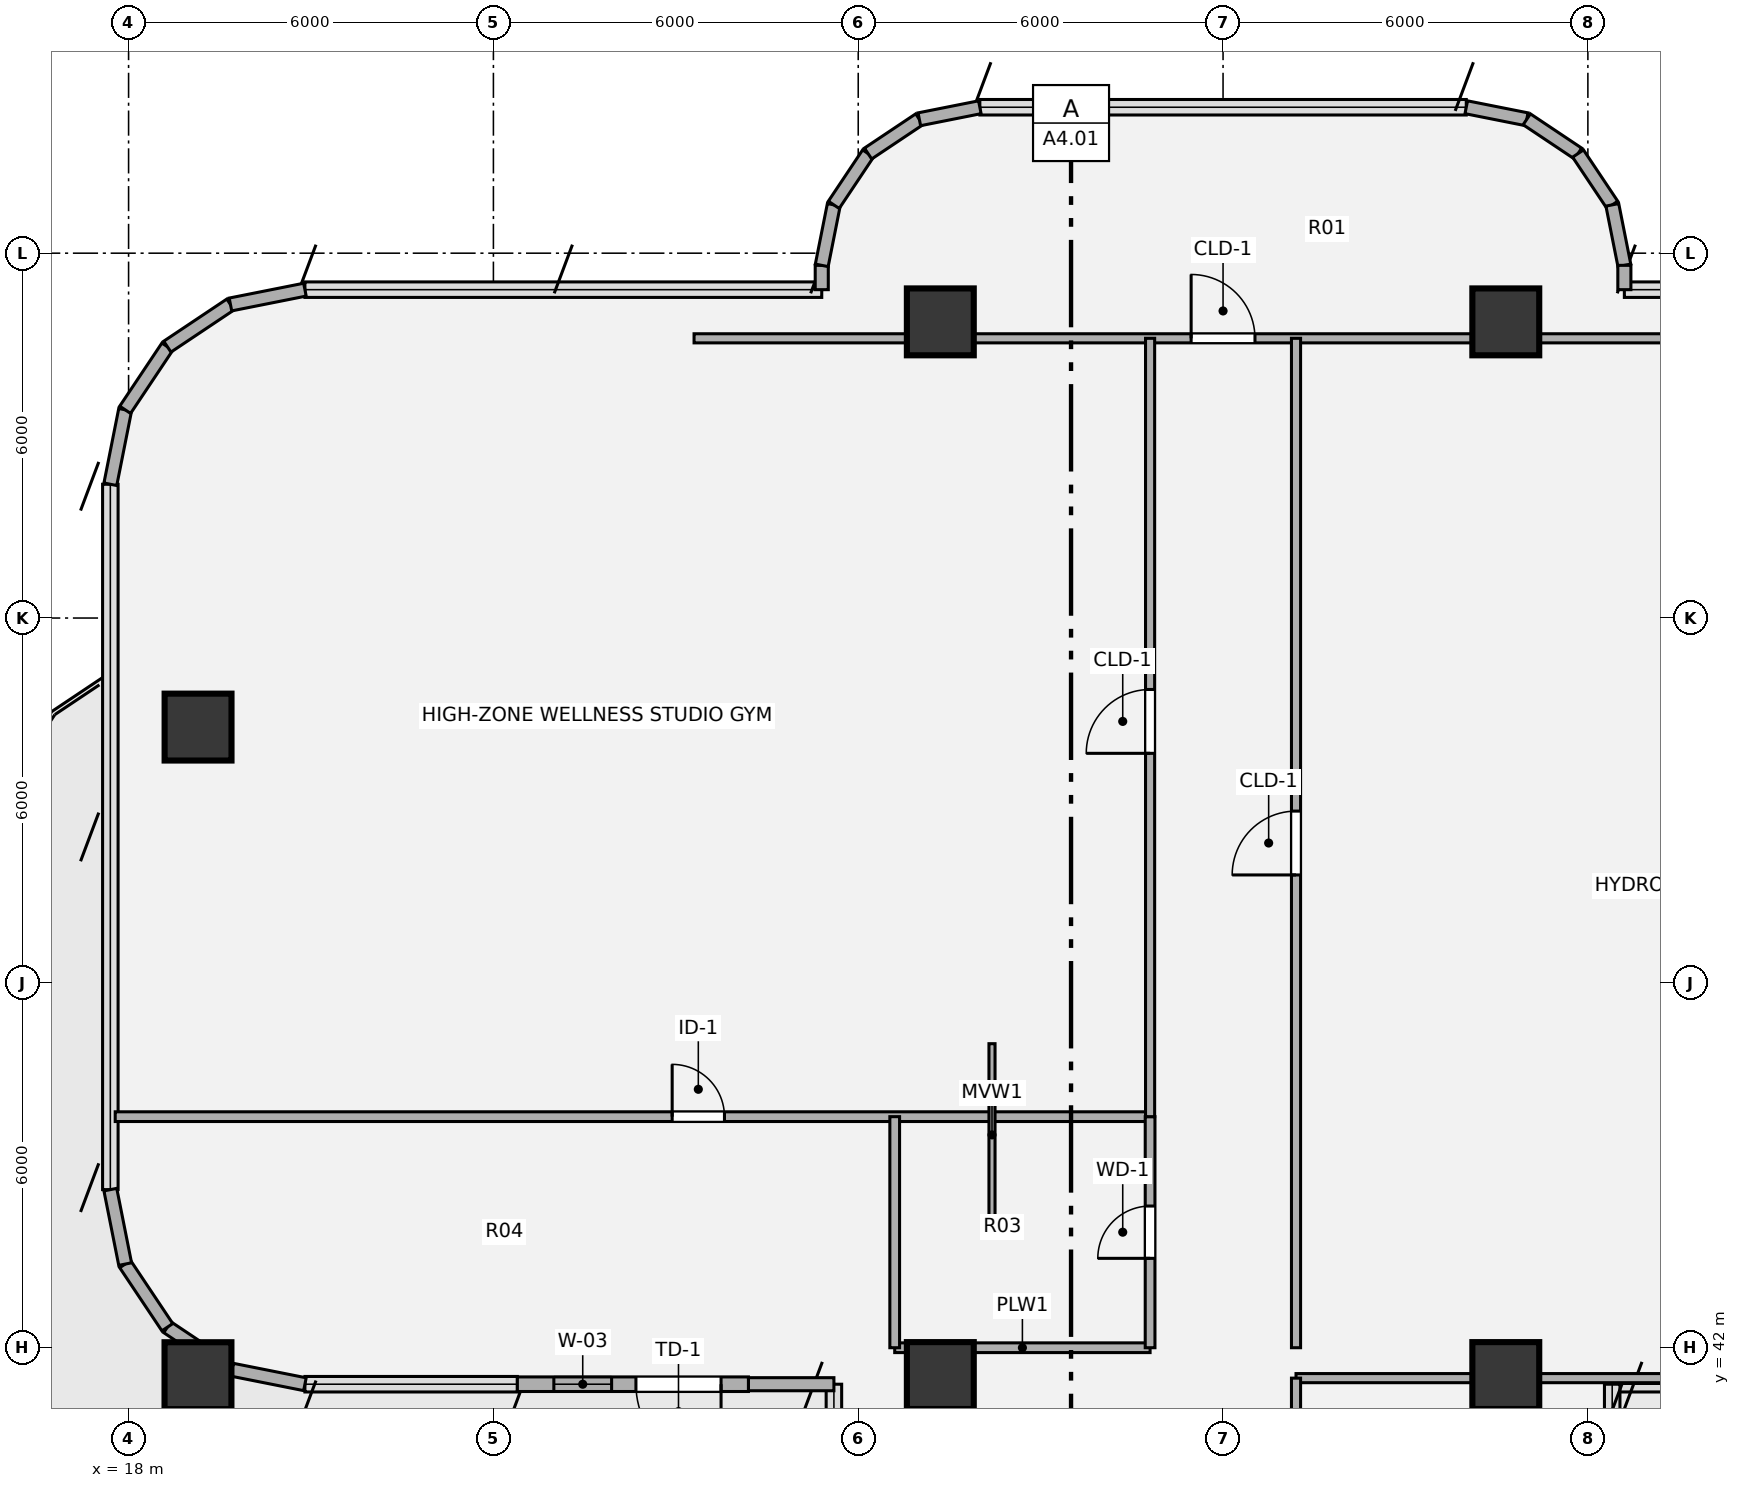
"""IFC4 building model, lengths in metres.
Left out: names, types, materials, properties, quantities, classifications, styles, units other than length and angle.
Written with IfcOpenShell. Run it as: python <this file> out.ifc"""

import sys

from ifc_helpers import new_model, si_unit, direction, frame, frame_2d, origin, origin_2d, place, context, subcontext, project, spatial, rectangle, hollow_circle, extrude, source, transform, mapped, element, fill, save


model = new_model("IFC4")
c1 = context("Model", 3, precision=1e-05, world=origin(), true_north=direction((0.0, 1.0)))
c2 = subcontext(c1, "Body", "Model", "MODEL_VIEW")
j1 = project(units=[si_unit("LENGTHUNIT", "METRE"), si_unit("PLANEANGLEUNIT", "RADIAN")], contexts=[c1])
p1 = place(None, origin())
s1 = spatial("IfcSite", under=j1, at=p1, CompositionType="ELEMENT")
p2 = place(p1, origin())
s2 = spatial("IfcBuilding", under=s1, at=p2, CompositionType="ELEMENT")
p3 = place(p2, frame((0.0, 0.0, 218.52)))
s3 = spatial("IfcBuildingStorey", under=s2, at=p3, CompositionType="ELEMENT", Elevation=218.52)
m1 = source(origin(), c2, "Body", "SweptSolid", [
    extrude(hollow_circle(Radius=0.55, WallThickness=0.04, at=origin_2d()), origin(), (0.0, 0.0, 1.0), 5.049),
])
p4 = place(p3, frame((18.786, 39.859, 0.0), z_axis=(0.140579075129, 0.665997599821, 0.73258768804), x_axis=(-0.978440346297, 0.206529631621, 0.0)))
e1 = element("IfcColumn", 1, at=p4, inside=s3, PredefinedType="COLUMN", context=c2, shape_type="MappedRepresentation", body=[
    mapped(m1, transform((0.0, 0.0, 0.0), x_axis=(1.0, 0.0, 0.0), y_axis=(0.0, 1.0, 0.0), z_axis=(0.0, 0.0, 1.0), scale=1.0)),
])
m2 = source(origin(), c2, "Body", "SweptSolid", [
    extrude(hollow_circle(Radius=0.55, WallThickness=0.04, at=origin_2d()), origin(), (0.0, 0.0, 1.0), 4.92),
])
p5 = place(p3, frame((18.786, 50.632, 0.0), z_axis=(0.144797912538, 0.640177474177, 0.754457663545), x_axis=(-0.975361817364, 0.220611253629, 0.0)))
e2 = element("IfcColumn", 2, at=p5, inside=s3, PredefinedType="COLUMN", context=c2, shape_type="MappedRepresentation", body=[
    mapped(m2, transform((0.0, 0.0, 0.0), x_axis=(1.0, 0.0, 0.0), y_axis=(0.0, 1.0, 0.0), z_axis=(0.0, 0.0, 1.0), scale=1.0)),
])
m3 = source(origin(), c2, "Body", "SweptSolid", [
    extrude(hollow_circle(Radius=0.55, WallThickness=0.04, at=origin_2d()), origin(), (0.0, 0.0, 1.0), 5.004),
])
for number, where, z_axis, x_axis in (
    (3, (31.35, 39.859, 0.0), (0.0, 0.673, 0.74), (-1.0, 0.0, 0.0)),
    (4, (40.65, 39.859, 0.0), (0.0, 0.673, 0.74), (-1.0, 0.0, 0.0)),
):
    element("IfcColumn", number, at=place(p3, frame(where, z_axis=z_axis, x_axis=x_axis)), inside=s3, PredefinedType="COLUMN", context=c2, shape_type="MappedRepresentation", body=[
        mapped(m3, transform((0.0, 0.0, 0.0), x_axis=(1.0, 0.0, 0.0), y_axis=(0.0, 1.0, 0.0), z_axis=(0.0, 0.0, 1.0), scale=1.0)),
    ])
m4 = source(origin(), c2, "Body", "SweptSolid", [
    extrude(hollow_circle(Radius=0.55, WallThickness=0.04, at=origin_2d()), origin(), (0.0, 0.0, 1.0), 4.429),
])
for number, where, z_axis, x_axis in (
    (5, (31.35, 57.723, 0.0), (0.0, 0.518, 0.855), (-1.0, 0.0, 0.0)),
    (6, (40.65, 57.723, 0.0), (0.0, 0.518, 0.855), (-1.0, 0.0, 0.0)),
):
    element("IfcColumn", number, at=place(p3, frame(where, z_axis=z_axis, x_axis=x_axis)), inside=s3, PredefinedType="COLUMN", context=c2, shape_type="MappedRepresentation", body=[
        mapped(m4, transform((0.0, 0.0, 0.0), x_axis=(1.0, 0.0, 0.0), y_axis=(0.0, 1.0, 0.0), z_axis=(0.0, 0.0, 1.0), scale=1.0)),
    ])
p6 = place(p3, frame((29.6, 41.4, 0.0), z_axis=(0.0, 0.0, 1.0), x_axis=(-1.0, 0.0, 0.0)))
e7 = element("IfcWall", 7, at=p6, inside=s3, PredefinedType="SOLIDWALL", context=c2, shape_type="SweptSolid", body=[
    extrude(rectangle(XDim=1.406, YDim=0.215, at=frame_2d((0.703, 0.0))), origin(), (0.0, 0.0, 1.0), 4.092),
])
p7 = place(p3, frame((28.194, 41.4, 0.0), z_axis=(0.0, 0.0, 1.0), x_axis=(-1.0, 0.0, 0.0)))
e8 = element("IfcWall", 8, at=p7, inside=s3, PredefinedType="SOLIDWALL", context=c2, shape_type="SweptSolid", body=[
    extrude(rectangle(XDim=3.8, YDim=0.24, at=frame_2d((1.9, 0.0))), origin(), (0.0, 0.0, 1.0), 4.092),
])
p8 = place(p7, frame((0.45, 0.0, 0.0)))
e9 = element("IfcOpeningElement", 9, at=p8, cuts=e8, PredefinedType="OPENING", context=c2, shape_type="SweptSolid", body=[
    extrude(rectangle(XDim=1.4, YDim=2.15, at=origin_2d()), frame((0.7, 0.13, 1.075), z_axis=(0.0, -1.0, 0.0), x_axis=(1.0, 0.0, 0.0)), (0.0, 0.0, 1.0), 0.26),
])
p9 = place(p7, frame((2.25, 0.0, 0.85)))
e10 = element("IfcOpeningElement", 10, at=p9, cuts=e8, PredefinedType="OPENING", context=c2, shape_type="SweptSolid", body=[
    extrude(rectangle(XDim=0.95, YDim=1.35, at=origin_2d()), frame((0.475, 0.13, 0.675), z_axis=(0.0, -1.0, 0.0), x_axis=(1.0, 0.0, 0.0)), (0.0, 0.0, 1.0), 0.26),
])
for number, where, z_axis, x_axis in (
    (11, (20.9, 41.4, 0.0), (0.0, 0.0, 1.0), (-0.981, 0.195, 0.0)),
    (12, (19.675, 41.644, 0.0), (0.0, 0.0, 1.0), (-0.831, 0.556, 0.0)),
    (13, (18.637, 42.337, 0.0), (0.0, 0.0, 1.0), (-0.556, 0.831, 0.0)),
    (14, (17.944, 43.375, 0.0), (0.0, 0.0, 1.0), (-0.195, 0.981, 0.0)),
    (15, (17.7, 56.2, 0.0), (0.0, 0.0, 1.0), (0.195, 0.981, 0.0)),
    (16, (17.944, 57.425, 0.0), (0.0, 0.0, 1.0), (0.556, 0.831, 0.0)),
    (17, (18.637, 58.463, 0.0), (0.0, 0.0, 1.0), (0.831, 0.556, 0.0)),
    (18, (19.675, 59.156, 0.0), (0.0, 0.0, 1.0), (0.981, 0.195, 0.0)),
):
    element("IfcWall", number, at=place(p3, frame(where, z_axis=z_axis, x_axis=x_axis)), inside=s3, PredefinedType="SOLIDWALL", context=c2, shape_type="SweptSolid", body=[
        extrude(rectangle(XDim=1.249, YDim=0.215, at=frame_2d((0.624, 0.0))), origin(), (0.0, 0.0, 1.0), 4.092),
    ])
p10 = place(p3, frame((29.4, 59.4, 0.0), z_axis=(0.0, 0.0, 1.0), x_axis=(0.0, 1.0, 0.0)))
e19 = element("IfcWall", 19, at=p10, inside=s3, PredefinedType="SOLIDWALL", context=c2, shape_type="SweptSolid", body=[
    extrude(rectangle(XDim=0.4, YDim=0.215, at=frame_2d((0.2, 0.0))), origin(), (0.0, 0.0, 1.0), 4.092),
])
p11 = place(p3, frame((29.4, 59.8, 0.0), z_axis=(0.0, 0.0, 1.0), x_axis=(0.195190360752, 0.980765376158, 0.0)))
e20 = element("IfcWall", 20, at=p11, inside=s3, PredefinedType="SOLIDWALL", context=c2, shape_type="SweptSolid", body=[
    extrude(rectangle(XDim=1.014, YDim=0.215, at=frame_2d((0.507, 0.0))), origin(), (0.0, 0.0, 1.0), 4.092),
])
p12 = place(p3, frame((29.598, 60.795, 0.0), z_axis=(0.0, 0.0, 1.0), x_axis=(0.555643898837, 0.831420385657, 0.0)))
e21 = element("IfcWall", 21, at=p12, inside=s3, PredefinedType="SOLIDWALL", context=c2, shape_type="SweptSolid", body=[
    extrude(rectangle(XDim=1.015, YDim=0.215, at=frame_2d((0.507, 0.0))), origin(), (0.0, 0.0, 1.0), 4.092),
])
p13 = place(p3, frame((30.162, 61.638, 0.0), z_axis=(0.0, 0.0, 1.0), x_axis=(0.831346067305, 0.555755086685, 0.0)))
e22 = element("IfcWall", 22, at=p13, inside=s3, PredefinedType="SOLIDWALL", context=c2, shape_type="SweptSolid", body=[
    extrude(rectangle(XDim=1.014, YDim=0.215, at=frame_2d((0.507, 0.0))), origin(), (0.0, 0.0, 1.0), 4.092),
])
for number, where, z_axis, x_axis in (
    (23, (31.005, 62.202, 0.0), (0.0, 0.0, 1.0), (0.981, 0.195, 0.0)),
    (24, (40.0, 62.4, 0.0), (0.0, 0.0, 1.0), (0.981, -0.195, 0.0)),
):
    element("IfcWall", number, at=place(p3, frame(where, z_axis=z_axis, x_axis=x_axis)), inside=s3, PredefinedType="SOLIDWALL", context=c2, shape_type="SweptSolid", body=[
        extrude(rectangle(XDim=1.015, YDim=0.215, at=frame_2d((0.507, 0.0))), origin(), (0.0, 0.0, 1.0), 4.092),
    ])
p14 = place(p3, frame((40.995, 62.202, 0.0), z_axis=(0.0, 0.0, 1.0), x_axis=(0.831346067305, -0.555755086685, 0.0)))
e25 = element("IfcWall", 25, at=p14, inside=s3, PredefinedType="SOLIDWALL", context=c2, shape_type="SweptSolid", body=[
    extrude(rectangle(XDim=1.014, YDim=0.215, at=frame_2d((0.507, 0.0))), origin(), (0.0, 0.0, 1.0), 4.092),
])
p15 = place(p3, frame((41.838, 61.638, 0.0), z_axis=(0.0, 0.0, 1.0), x_axis=(0.555643898837, -0.831420385657, 0.0)))
e26 = element("IfcWall", 26, at=p15, inside=s3, PredefinedType="SOLIDWALL", context=c2, shape_type="SweptSolid", body=[
    extrude(rectangle(XDim=1.015, YDim=0.215, at=frame_2d((0.507, 0.0))), origin(), (0.0, 0.0, 1.0), 4.092),
])
p16 = place(p3, frame((42.402, 60.795, 0.0), z_axis=(0.0, 0.0, 1.0), x_axis=(0.195190360752, -0.980765376158, 0.0)))
e27 = element("IfcWall", 27, at=p16, inside=s3, PredefinedType="SOLIDWALL", context=c2, shape_type="SweptSolid", body=[
    extrude(rectangle(XDim=1.014, YDim=0.215, at=frame_2d((0.507, 0.0))), origin(), (0.0, 0.0, 1.0), 4.092),
])
p17 = place(p3, frame((42.6, 59.8, 0.0), z_axis=(0.0, 0.0, 1.0), x_axis=(0.0, -1.0, 0.0)))
e28 = element("IfcWall", 28, at=p17, inside=s3, PredefinedType="SOLIDWALL", context=c2, shape_type="SweptSolid", body=[
    extrude(rectangle(XDim=0.4, YDim=0.215, at=frame_2d((0.2, 0.0))), origin(), (0.0, 0.0, 1.0), 4.092),
])
p18 = place(p3, frame((37.2, 41.5, 0.0), z_axis=(0.0, 0.0, 1.0), x_axis=(1.0, 0.0, 0.0)))
e29 = element("IfcWall", 29, at=p18, inside=s3, PredefinedType="PARTITIONING", context=c2, shape_type="SweptSolid", body=[
    extrude(rectangle(XDim=7.21, YDim=0.15, at=frame_2d((3.605, 0.0))), origin(), (0.0, 0.0, 1.0), 4.062),
])
p19 = place(p3, frame((30.6, 42.0, 0.0), z_axis=(0.0, 0.0, 1.0), x_axis=(1.0, 0.0, 0.0)))
e30 = element("IfcWall", 30, at=p19, inside=s3, PredefinedType="PLUMBINGWALL", context=c2, shape_type="SweptSolid", body=[
    extrude(rectangle(XDim=4.2, YDim=0.16, at=frame_2d((2.1, 0.0))), origin(), (0.0, 0.0, 1.0), 4.062),
])
p20 = place(p3, frame((17.78, 45.8, 0.0), z_axis=(0.0, 0.0, 1.0), x_axis=(1.0, 0.0, 0.0)))
e31 = element("IfcWall", 31, at=p20, inside=s3, PredefinedType="PLUMBINGWALL", context=c2, shape_type="SweptSolid", body=[
    extrude(rectangle(XDim=17.02, YDim=0.16, at=frame_2d((8.51, 0.0))), origin(), (0.0, 0.0, 1.0), 3.544),
])
p21 = place(p20, frame((9.16, 0.0, 0.0)))
e32 = element("IfcOpeningElement", 32, at=p21, cuts=e31, PredefinedType="OPENING", context=c2, shape_type="SweptSolid", body=[
    extrude(rectangle(XDim=0.86, YDim=2.1, at=origin_2d()), frame((0.43, 0.09, 1.05), z_axis=(0.0, -1.0, 0.0), x_axis=(1.0, 0.0, 0.0)), (0.0, 0.0, 1.0), 0.18),
])
p22 = place(p3, frame((27.3, 58.6, 0.0), z_axis=(0.0, 0.0, 1.0), x_axis=(1.0, 0.0, 0.0)))
e33 = element("IfcWall", 33, at=p22, inside=s3, PredefinedType="PARTITIONING", context=c2, shape_type="SweptSolid", body=[
    extrude(rectangle(XDim=17.4, YDim=0.15, at=frame_2d((8.7, 0.0))), origin(), (0.0, 0.0, 1.0), 3.87),
])
p23 = place(p22, frame((8.175, 0.0, 0.0)))
e34 = element("IfcOpeningElement", 34, at=p23, cuts=e33, PredefinedType="OPENING", context=c2, shape_type="SweptSolid", body=[
    extrude(rectangle(XDim=1.05, YDim=2.1, at=origin_2d()), frame((0.525, 0.085, 1.05), z_axis=(0.0, -1.0, 0.0), x_axis=(1.0, 0.0, 0.0)), (0.0, 0.0, 1.0), 0.17),
])
p24 = place(p3, frame((30.6, 42.0, 0.0), z_axis=(0.0, 0.0, 1.0), x_axis=(0.0, 1.0, 0.0)))
e35 = element("IfcWall", 35, at=p24, inside=s3, PredefinedType="PLUMBINGWALL", context=c2, shape_type="SweptSolid", body=[
    extrude(rectangle(XDim=3.8, YDim=0.16, at=frame_2d((1.9, 0.0))), origin(), (0.0, 0.0, 1.0), 4.062),
])
p25 = place(p3, frame((34.8, 42.0, 0.0), z_axis=(0.0, 0.0, 1.0), x_axis=(0.0, 1.0, 0.0)))
e36 = element("IfcWall", 36, at=p25, inside=s3, PredefinedType="PLUMBINGWALL", context=c2, shape_type="SweptSolid", body=[
    extrude(rectangle(XDim=3.8, YDim=0.16, at=frame_2d((1.9, 0.0))), origin(), (0.0, 0.0, 1.0), 4.062),
])
p26 = place(p25, frame((1.47, 0.0, 0.0)))
e37 = element("IfcOpeningElement", 37, at=p26, cuts=e36, PredefinedType="OPENING", context=c2, shape_type="SweptSolid", body=[
    extrude(rectangle(XDim=0.86, YDim=2.1, at=origin_2d()), frame((0.43, 0.09, 1.05), z_axis=(0.0, -1.0, 0.0), x_axis=(1.0, 0.0, 0.0)), (0.0, 0.0, 1.0), 0.18),
])
p27 = place(p3, frame((34.8, 45.8, 0.0), z_axis=(0.0, 0.0, 1.0), x_axis=(0.0, 1.0, 0.0)))
e38 = element("IfcWall", 38, at=p27, inside=s3, PredefinedType="PARTITIONING", context=c2, shape_type="SweptSolid", body=[
    extrude(rectangle(XDim=12.8, YDim=0.15, at=frame_2d((6.4, 0.0))), origin(), (0.0, 0.0, 1.0), 4.062),
])
p28 = place(p27, frame((5.975, 0.0, 0.0)))
e39 = element("IfcOpeningElement", 39, at=p28, cuts=e38, PredefinedType="OPENING", context=c2, shape_type="SweptSolid", body=[
    extrude(rectangle(XDim=1.05, YDim=2.1, at=origin_2d()), frame((0.525, 0.085, 1.05), z_axis=(0.0, -1.0, 0.0), x_axis=(1.0, 0.0, 0.0)), (0.0, 0.0, 1.0), 0.17),
])
p29 = place(p3, frame((37.2, 31.0, 0.0), z_axis=(0.0, 0.0, 1.0), x_axis=(0.0, 1.0, 0.0)))
e40 = element("IfcWall", 40, at=p29, inside=s3, PredefinedType="PARTITIONING", context=c2, shape_type="SweptSolid", body=[
    extrude(rectangle(XDim=10.5, YDim=0.15, at=frame_2d((5.25, 0.0))), origin(), (0.0, 0.0, 1.0), 4.062),
])
p30 = place(p29, frame((4.725, 0.0, 0.0)))
e41 = element("IfcOpeningElement", 41, at=p30, cuts=e40, PredefinedType="OPENING", context=c2, shape_type="SweptSolid", body=[
    extrude(rectangle(XDim=1.05, YDim=2.1, at=origin_2d()), frame((0.525, 0.085, 1.05), z_axis=(0.0, -1.0, 0.0), x_axis=(1.0, 0.0, 0.0)), (0.0, 0.0, 1.0), 0.17),
])
p31 = place(p3, frame((37.2, 42.0, 0.0), z_axis=(0.0, 0.0, 1.0), x_axis=(0.0, 1.0, 0.0)))
e42 = element("IfcWall", 42, at=p31, inside=s3, PredefinedType="PARTITIONING", context=c2, shape_type="SweptSolid", body=[
    extrude(rectangle(XDim=16.6, YDim=0.15, at=frame_2d((8.3, 0.0))), origin(), (0.0, 0.0, 1.0), 4.062),
])
p32 = place(p31, frame((7.775, 0.0, 0.0)))
e43 = element("IfcOpeningElement", 43, at=p32, cuts=e42, PredefinedType="OPENING", context=c2, shape_type="SweptSolid", body=[
    extrude(rectangle(XDim=1.05, YDim=2.1, at=origin_2d()), frame((0.525, 0.085, 1.05), z_axis=(0.0, -1.0, 0.0), x_axis=(1.0, 0.0, 0.0)), (0.0, 0.0, 1.0), 0.17),
])
p33 = place(p3, frame((32.2, 44.0, 0.0), z_axis=(0.0, 0.0, 1.0), x_axis=(0.0, 1.0, 0.0)))
e44 = element("IfcWall", 44, at=p33, inside=s3, PredefinedType="MOVABLE", context=c2, shape_type="SweptSolid", body=[
    extrude(rectangle(XDim=3.0, YDim=0.1, at=frame_2d((1.5, 0.0))), origin(), (0.0, 0.0, 1.0), 2.85),
])
m5 = source(origin(), c2, "Body", "SweptSolid", [
    extrude(rectangle(XDim=1.4, YDim=2.15, at=origin_2d()), frame((0.7, 0.025, 1.075), z_axis=(0.0, -1.0, 0.0), x_axis=(1.0, 0.0, 0.0)), (0.0, 0.0, 1.0), 0.05),
])
p34 = place(p8, origin())
e45 = element("IfcDoor", 45, at=p34, inside=s3, OperationType="SINGLE_SWING_LEFT", PredefinedType="DOOR", context=c2, shape_type="MappedRepresentation", body=[
    mapped(m5, transform((0.0, 0.0, 0.0), x_axis=(1.0, 0.0, 0.0), y_axis=(0.0, 1.0, 0.0), z_axis=(0.0, 0.0, 1.0), scale=1.0)),
])
fill(e9, e45)
m6 = source(origin(), c2, "Body", "SweptSolid", [
    extrude(rectangle(XDim=0.95, YDim=1.35, at=origin_2d()), frame((0.475, 0.03, 0.675), z_axis=(0.0, -1.0, 0.0), x_axis=(1.0, 0.0, 0.0)), (0.0, 0.0, 1.0), 0.06),
])
p35 = place(p9, origin())
e46 = element("IfcWindow", 46, at=p35, inside=s3, PartitioningType="SINGLE_PANEL", PredefinedType="WINDOW", context=c2, shape_type="MappedRepresentation", body=[
    mapped(m6, transform((0.0, 0.0, 0.0), x_axis=(1.0, 0.0, 0.0), y_axis=(0.0, 1.0, 0.0), z_axis=(0.0, 0.0, 1.0), scale=1.0)),
])
fill(e10, e46)
m7 = source(origin(), c2, "Body", "SweptSolid", [
    extrude(rectangle(XDim=0.86, YDim=2.1, at=origin_2d()), frame((0.43, 0.025, 1.05), z_axis=(0.0, -1.0, 0.0), x_axis=(1.0, 0.0, 0.0)), (0.0, 0.0, 1.0), 0.05),
])
p36 = place(p21, origin())
e47 = element("IfcDoor", 47, at=p36, inside=s3, OperationType="SINGLE_SWING_LEFT", PredefinedType="DOOR", context=c2, shape_type="MappedRepresentation", body=[
    mapped(m7, transform((0.0, 0.0, 0.0), x_axis=(1.0, 0.0, 0.0), y_axis=(0.0, 1.0, 0.0), z_axis=(0.0, 0.0, 1.0), scale=1.0)),
])
fill(e32, e47)
m8 = source(origin(), c2, "Body", "SweptSolid", [
    extrude(rectangle(XDim=1.05, YDim=2.1, at=origin_2d()), frame((0.525, 0.025, 1.05), z_axis=(0.0, -1.0, 0.0), x_axis=(1.0, 0.0, 0.0)), (0.0, 0.0, 1.0), 0.05),
])
p37 = place(p23, origin())
e48 = element("IfcDoor", 48, at=p37, inside=s3, OperationType="SINGLE_SWING_LEFT", PredefinedType="DOOR", context=c2, shape_type="MappedRepresentation", body=[
    mapped(m8, transform((0.0, 0.0, 0.0), x_axis=(1.0, 0.0, 0.0), y_axis=(0.0, 1.0, 0.0), z_axis=(0.0, 0.0, 1.0), scale=1.0)),
])
fill(e34, e48)
m9 = source(origin(), c2, "Body", "SweptSolid", [
    extrude(rectangle(XDim=0.86, YDim=2.1, at=origin_2d()), frame((0.43, 0.025, 1.05), z_axis=(0.0, -1.0, 0.0), x_axis=(1.0, 0.0, 0.0)), (0.0, 0.0, 1.0), 0.05),
])
p38 = place(p26, origin())
e49 = element("IfcDoor", 49, at=p38, inside=s3, OperationType="SINGLE_SWING_LEFT", PredefinedType="DOOR", context=c2, shape_type="MappedRepresentation", body=[
    mapped(m9, transform((0.0, 0.0, 0.0), x_axis=(1.0, 0.0, 0.0), y_axis=(0.0, 1.0, 0.0), z_axis=(0.0, 0.0, 1.0), scale=1.0)),
])
fill(e37, e49)
p39 = place(p28, origin())
e50 = element("IfcDoor", 50, at=p39, inside=s3, OperationType="SINGLE_SWING_LEFT", PredefinedType="DOOR", context=c2, shape_type="MappedRepresentation", body=[
    mapped(m8, transform((0.0, 0.0, 0.0), x_axis=(1.0, 0.0, 0.0), y_axis=(0.0, 1.0, 0.0), z_axis=(0.0, 0.0, 1.0), scale=1.0)),
])
fill(e39, e50)
p40 = place(p32, origin())
e51 = element("IfcDoor", 51, at=p40, inside=s3, OperationType="SINGLE_SWING_LEFT", PredefinedType="DOOR", context=c2, shape_type="MappedRepresentation", body=[
    mapped(m8, transform((0.0, 0.0, 0.0), x_axis=(1.0, 0.0, 0.0), y_axis=(0.0, 1.0, 0.0), z_axis=(0.0, 0.0, 1.0), scale=1.0)),
])
fill(e43, e51)
save(model, sys.argv[1])
